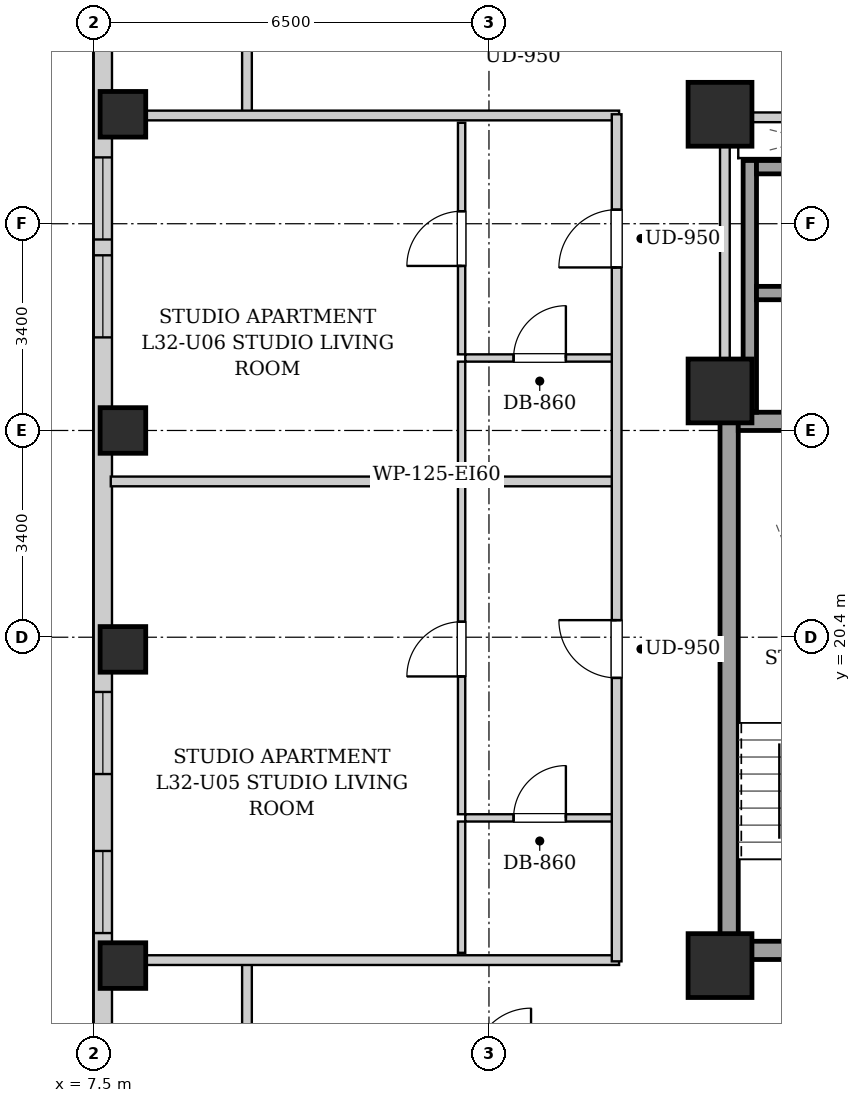
"""IFC4 building model, lengths in metres.
Left out: names, types, materials, properties, quantities, classifications, styles, units other than length and angle.
Written with IfcOpenShell. Run it as: python <this file> out.ifc"""

import sys

from ifc_helpers import new_model, si_unit, direction, frame, frame_2d, origin, origin_2d, place, context, subcontext, project, spatial, rectangle, extrude, element, fill, save


model = new_model("IFC4")
c1 = context("Model", 3, precision=1e-05, world=origin(), true_north=direction((0.0, 1.0)))
c2 = subcontext(c1, "Body", "Model", "MODEL_VIEW")
j1 = project(units=[si_unit("LENGTHUNIT", "METRE"), si_unit("PLANEANGLEUNIT", "RADIAN")], contexts=[c1])
p1 = place(None, origin())
s1 = spatial("IfcSite", under=j1, at=p1, CompositionType="ELEMENT")
p2 = place(p1, origin())
s2 = spatial("IfcBuilding", under=s1, at=p2, CompositionType="ELEMENT")
p3 = place(p2, frame((0.0, 0.0, 113.5)))
s3 = spatial("IfcBuildingStorey", under=s2, at=p3, CompositionType="ELEMENT", Elevation=113.5)
for number, where, z_axis, x_axis in (
    (1, (7.98, 15.0, 0.0), (0.0, 0.0, 1.0), (1.0, 0.0, 0.0)),
    (2, (7.98, 20.2, 0.0), (0.0, 0.0, 1.0), (1.0, 0.0, 0.0)),
    (3, (7.98, 23.8, 0.0), (0.0, 0.0, 1.0), (1.0, 0.0, 0.0)),
    (4, (7.98, 29.0, 0.0), (0.0, 0.0, 1.0), (1.0, 0.0, 0.0)),
):
    element("IfcColumn", number, at=place(p3, frame(where, z_axis=z_axis, x_axis=x_axis)), inside=s3, PredefinedType="COLUMN", context=c2, shape_type="SweptSolid", body=[
        extrude(rectangle(XDim=0.75, YDim=0.75, at=origin_2d()), origin(), (0.0, 0.0, 1.0), 3.2),
    ])
for number, where, z_axis, x_axis in (
    (5, (17.8, 15.0, 0.0), (0.0, 0.0, 1.0), (1.0, 0.0, 0.0)),
    (6, (17.8, 29.0, 0.0), (0.0, 0.0, 1.0), (1.0, 0.0, 0.0)),
    (7, (17.8, 24.45, 0.0), (0.0, 0.0, 1.0), (1.0, 0.0, 0.0)),
):
    element("IfcColumn", number, at=place(p3, frame(where, z_axis=z_axis, x_axis=x_axis)), inside=s3, PredefinedType="COLUMN", context=c2, shape_type="SweptSolid", body=[
        extrude(rectangle(XDim=1.05, YDim=1.05, at=origin_2d()), origin(), (0.0, 0.0, 1.0), 3.2),
    ])
p4 = place(p3, frame((7.65, 2.5, 0.0), z_axis=(0.0, 0.0, 1.0), x_axis=(0.0, 1.0, 0.0)))
e8 = element("IfcWall", 8, at=p4, inside=s3, PredefinedType="SOLIDWALL", context=c2, shape_type="SweptSolid", body=[
    extrude(rectangle(XDim=38.3, YDim=0.3, at=frame_2d((19.15, 0.0))), origin(), (0.0, 0.0, 1.0), 2.94),
])
p5 = place(p4, frame((3.38, 0.0, 0.55)))
e9 = element("IfcOpeningElement", 9, at=p5, cuts=e8, PredefinedType="OPENING", context=c2, shape_type="SweptSolid", body=[
    extrude(rectangle(XDim=1.35, YDim=1.2, at=frame_2d((0.675, 0.6))), frame((0.0, 0.16, 0.0), z_axis=(0.0, -1.0, 0.0), x_axis=(1.0, 0.0, 0.0)), (0.0, 0.0, 1.0), 0.32),
])
p6 = place(p4, frame((1.135, 0.0, 0.55)))
e10 = element("IfcOpeningElement", 10, at=p6, cuts=e8, PredefinedType="OPENING", context=c2, shape_type="SweptSolid", body=[
    extrude(rectangle(XDim=1.35, YDim=1.2, at=frame_2d((0.675, 0.6))), frame((0.0, 0.16, 0.0), z_axis=(0.0, -1.0, 0.0), x_axis=(1.0, 0.0, 0.0)), (0.0, 0.0, 1.0), 0.32),
])
p7 = place(p4, frame((33.946, 0.0, 0.55)))
e11 = element("IfcOpeningElement", 11, at=p7, cuts=e8, PredefinedType="OPENING", context=c2, shape_type="SweptSolid", body=[
    extrude(rectangle(XDim=1.35, YDim=1.2, at=frame_2d((0.675, 0.6))), frame((0.0, 0.16, 0.0), z_axis=(0.0, -1.0, 0.0), x_axis=(1.0, 0.0, 0.0)), (0.0, 0.0, 1.0), 0.32),
])
p8 = place(p4, frame((32.035, 0.0, 0.55)))
e12 = element("IfcOpeningElement", 12, at=p8, cuts=e8, PredefinedType="OPENING", context=c2, shape_type="SweptSolid", body=[
    extrude(rectangle(XDim=1.35, YDim=1.2, at=frame_2d((0.675, 0.6))), frame((0.0, 0.16, 0.0), z_axis=(0.0, -1.0, 0.0), x_axis=(1.0, 0.0, 0.0)), (0.0, 0.0, 1.0), 0.32),
])
p9 = place(p4, frame((15.65, 0.0, 0.55)))
e13 = element("IfcOpeningElement", 13, at=p9, cuts=e8, PredefinedType="OPENING", context=c2, shape_type="SweptSolid", body=[
    extrude(rectangle(XDim=1.35, YDim=1.2, at=frame_2d((0.675, 0.6))), frame((0.0, 0.16, 0.0), z_axis=(0.0, -1.0, 0.0), x_axis=(1.0, 0.0, 0.0)), (0.0, 0.0, 1.0), 0.32),
])
p10 = place(p4, frame((13.035, 0.0, 0.55)))
e14 = element("IfcOpeningElement", 14, at=p10, cuts=e8, PredefinedType="OPENING", context=c2, shape_type="SweptSolid", body=[
    extrude(rectangle(XDim=1.35, YDim=1.2, at=frame_2d((0.675, 0.6))), frame((0.0, 0.16, 0.0), z_axis=(0.0, -1.0, 0.0), x_axis=(1.0, 0.0, 0.0)), (0.0, 0.0, 1.0), 0.32),
])
p11 = place(p4, frame((22.831, 0.0, 0.55)))
e15 = element("IfcOpeningElement", 15, at=p11, cuts=e8, PredefinedType="OPENING", context=c2, shape_type="SweptSolid", body=[
    extrude(rectangle(XDim=1.35, YDim=1.2, at=frame_2d((0.675, 0.6))), frame((0.0, 0.16, 0.0), z_axis=(0.0, -1.0, 0.0), x_axis=(1.0, 0.0, 0.0)), (0.0, 0.0, 1.0), 0.32),
])
p12 = place(p4, frame((24.441, 0.0, 0.55)))
e16 = element("IfcOpeningElement", 16, at=p12, cuts=e8, PredefinedType="OPENING", context=c2, shape_type="SweptSolid", body=[
    extrude(rectangle(XDim=1.35, YDim=1.2, at=frame_2d((0.675, 0.6))), frame((0.0, 0.16, 0.0), z_axis=(0.0, -1.0, 0.0), x_axis=(1.0, 0.0, 0.0)), (0.0, 0.0, 1.0), 0.32),
])
p13 = place(p3, frame((17.95, 15.1, 0.0), z_axis=(0.0, 0.0, 1.0), x_axis=(0.0, 1.0, 0.0)))
e17 = element("IfcWall", 17, at=p13, inside=s3, PredefinedType="SHEAR", context=c2, shape_type="SweptSolid", body=[
    extrude(rectangle(XDim=9.0, YDim=0.3, at=frame_2d((4.5, 0.0))), origin(), (0.0, 0.0, 1.0), 2.94),
])
p14 = place(p3, frame((18.1, 23.95, 0.0), z_axis=(0.0, 0.0, 1.0), x_axis=(1.0, 0.0, 0.0)))
e18 = element("IfcWall", 18, at=p14, inside=s3, PredefinedType="SHEAR", context=c2, shape_type="SweptSolid", body=[
    extrude(rectangle(XDim=2.85, YDim=0.3, at=frame_2d((1.425, 0.0))), origin(), (0.0, 0.0, 1.0), 2.94),
])
p15 = place(p3, frame((18.1, 15.25, 0.0), z_axis=(0.0, 0.0, 1.0), x_axis=(1.0, 0.0, 0.0)))
e19 = element("IfcWall", 19, at=p15, inside=s3, PredefinedType="SHEAR", context=c2, shape_type="SweptSolid", body=[
    extrude(rectangle(XDim=2.85, YDim=0.3, at=frame_2d((1.425, 0.0))), origin(), (0.0, 0.0, 1.0), 2.94),
])
p16 = place(p15, frame((0.86, 0.0, 0.0)))
e20 = element("IfcOpeningElement", 20, at=p16, cuts=e19, PredefinedType="OPENING", context=c2, shape_type="SweptSolid", body=[
    extrude(rectangle(XDim=1.1, YDim=2.05, at=frame_2d((0.55, 1.025))), frame((0.0, 0.16, 0.0), z_axis=(0.0, -1.0, 0.0), x_axis=(1.0, 0.0, 0.0)), (0.0, 0.0, 1.0), 0.32),
])
p17 = place(p3, frame((18.29, 24.1, 0.0), z_axis=(0.0, 0.0, 1.0), x_axis=(0.0, 1.0, 0.0)))
e21 = element("IfcWall", 21, at=p17, inside=s3, PredefinedType="SHEAR", context=c2, shape_type="SweptSolid", body=[
    extrude(rectangle(XDim=4.14, YDim=0.22, at=frame_2d((2.07, 0.0))), origin(), (0.0, 0.0, 1.0), 2.94),
])
for number, where, z_axis, x_axis in (
    (22, (18.4, 26.06, 0.0), (0.0, 0.0, 1.0), (1.0, 0.0, 0.0)),
    (23, (18.4, 28.13, 0.0), (0.0, 0.0, 1.0), (1.0, 0.0, 0.0)),
):
    element("IfcWall", number, at=place(p3, frame(where, z_axis=z_axis, x_axis=x_axis)), inside=s3, PredefinedType="SHEAR", context=c2, shape_type="SweptSolid", body=[
        extrude(rectangle(XDim=1.9, YDim=0.22, at=frame_2d((0.95, 0.0))), origin(), (0.0, 0.0, 1.0), 2.94),
    ])
p18 = place(p3, frame((17.88, 24.12, 0.0), z_axis=(0.0, 0.0, 1.0), x_axis=(0.0, 1.0, 0.0)))
e24 = element("IfcWall", 24, at=p18, inside=s3, PredefinedType="PARTITIONING", context=c2, shape_type="SweptSolid", body=[
    extrude(rectangle(XDim=4.76, YDim=0.16, at=frame_2d((2.38, 0.0))), origin(), (0.0, 0.0, 1.0), 2.94),
])
p19 = place(p3, frame((17.96, 28.95, 0.0), z_axis=(0.0, 0.0, 1.0), x_axis=(1.0, 0.0, 0.0)))
e25 = element("IfcWall", 25, at=p19, inside=s3, PredefinedType="PARTITIONING", context=c2, shape_type="SweptSolid", body=[
    extrude(rectangle(XDim=4.29, YDim=0.16, at=frame_2d((2.145, 0.0))), origin(), (0.0, 0.0, 1.0), 2.313),
])
p20 = place(p19, frame((1.645, 0.0, 0.0)))
e26 = element("IfcOpeningElement", 26, at=p20, cuts=e25, PredefinedType="OPENING", context=c2, shape_type="SweptSolid", body=[
    extrude(rectangle(XDim=0.86, YDim=2.05, at=frame_2d((0.43, 1.025))), frame((0.0, 0.09, 0.0), z_axis=(0.0, -1.0, 0.0), x_axis=(1.0, 0.0, 0.0)), (0.0, 0.0, 1.0), 0.18),
])
for number, where, z_axis, x_axis in (
    (27, (10.02, 13.35, 0.0), (0.0, 0.0, 1.0), (0.0, 1.0, 0.0)),
    (28, (10.02, 28.98, 0.0), (0.0, 0.0, 1.0), (0.0, 1.0, 0.0)),
):
    element("IfcWall", number, at=place(p3, frame(where, z_axis=z_axis, x_axis=x_axis)), inside=s3, PredefinedType="PARTITIONING", context=c2, shape_type="SweptSolid", body=[
        extrude(rectangle(XDim=1.74, YDim=0.16, at=frame_2d((0.87, 0.0))), origin(), (0.0, 0.0, 1.0), 2.94),
    ])
for number, where, z_axis, x_axis in (
    (29, (7.78, 15.09, 0.0), (0.0, 0.0, 1.0), (1.0, 0.0, 0.0)),
    (30, (7.78, 28.98, 0.0), (0.0, 0.0, 1.0), (1.0, 0.0, 0.0)),
):
    element("IfcWall", number, at=place(p3, frame(where, z_axis=z_axis, x_axis=x_axis)), inside=s3, PredefinedType="PARTITIONING", context=c2, shape_type="SweptSolid", body=[
        extrude(rectangle(XDim=8.36, YDim=0.16, at=frame_2d((4.18, 0.0))), origin(), (0.0, 0.0, 1.0), 2.313),
    ])
p21 = place(p3, frame((7.78, 22.962, 0.0), z_axis=(0.0, 0.0, 1.0), x_axis=(1.0, 0.0, 0.0)))
e31 = element("IfcWall", 31, at=p21, inside=s3, PredefinedType="PARTITIONING", context=c2, shape_type="SweptSolid", body=[
    extrude(rectangle(XDim=8.28, YDim=0.16, at=frame_2d((4.14, 0.0))), origin(), (0.0, 0.0, 1.0), 2.94),
])
p22 = place(p3, frame((13.61, 17.429, 0.0), z_axis=(0.0, 0.0, 1.0), x_axis=(1.0, 0.0, 0.0)))
e32 = element("IfcWall", 32, at=p22, inside=s3, PredefinedType="PARTITIONING", context=c2, shape_type="SweptSolid", body=[
    extrude(rectangle(XDim=2.45, YDim=0.12, at=frame_2d((1.225, 0.0))), origin(), (0.0, 0.0, 1.0), 2.94),
])
p23 = place(p22, frame((0.795, 0.0, 0.0)))
e33 = element("IfcOpeningElement", 33, at=p23, cuts=e32, PredefinedType="OPENING", context=c2, shape_type="SweptSolid", body=[
    extrude(rectangle(XDim=0.86, YDim=2.05, at=frame_2d((0.43, 1.025))), frame((0.0, 0.07, 0.0), z_axis=(0.0, -1.0, 0.0), x_axis=(1.0, 0.0, 0.0)), (0.0, 0.0, 1.0), 0.14),
])
p24 = place(p3, frame((13.55, 15.21, 0.0), z_axis=(0.0, 0.0, 1.0), x_axis=(0.0, 1.0, 0.0)))
e34 = element("IfcWall", 34, at=p24, inside=s3, PredefinedType="PARTITIONING", context=c2, shape_type="SweptSolid", body=[
    extrude(rectangle(XDim=2.159, YDim=0.12, at=frame_2d((1.08, 0.0))), origin(), (0.0, 0.0, 1.0), 2.94),
])
p25 = place(p3, frame((13.55, 17.489, 0.0), z_axis=(0.0, 0.0, 1.0), x_axis=(0.0, 1.0, 0.0)))
e35 = element("IfcWall", 35, at=p25, inside=s3, PredefinedType="PARTITIONING", context=c2, shape_type="SweptSolid", body=[
    extrude(rectangle(XDim=5.433, YDim=0.12, at=frame_2d((2.717, 0.0))), origin(), (0.0, 0.0, 1.0), 2.94),
])
p26 = place(p25, frame((2.266, 0.0, 0.0)))
e36 = element("IfcOpeningElement", 36, at=p26, cuts=e35, PredefinedType="OPENING", context=c2, shape_type="SweptSolid", body=[
    extrude(rectangle(XDim=0.9, YDim=2.05, at=frame_2d((0.45, 1.025))), frame((0.0, 0.07, 0.0), z_axis=(0.0, -1.0, 0.0), x_axis=(1.0, 0.0, 0.0)), (0.0, 0.0, 1.0), 0.14),
])
p27 = place(p3, frame((13.61, 24.992, 0.0), z_axis=(0.0, 0.0, 1.0), x_axis=(1.0, 0.0, 0.0)))
e37 = element("IfcWall", 37, at=p27, inside=s3, PredefinedType="PARTITIONING", context=c2, shape_type="SweptSolid", body=[
    extrude(rectangle(XDim=2.45, YDim=0.12, at=frame_2d((1.225, 0.0))), origin(), (0.0, 0.0, 1.0), 2.94),
])
p28 = place(p27, frame((0.795, 0.0, 0.0)))
e38 = element("IfcOpeningElement", 38, at=p28, cuts=e37, PredefinedType="OPENING", context=c2, shape_type="SweptSolid", body=[
    extrude(rectangle(XDim=0.86, YDim=2.05, at=frame_2d((0.43, 1.025))), frame((0.0, 0.07, 0.0), z_axis=(0.0, -1.0, 0.0), x_axis=(1.0, 0.0, 0.0)), (0.0, 0.0, 1.0), 0.14),
])
p29 = place(p3, frame((13.55, 23.082, 0.0), z_axis=(0.0, 0.0, 1.0), x_axis=(0.0, 1.0, 0.0)))
e39 = element("IfcWall", 39, at=p29, inside=s3, PredefinedType="PARTITIONING", context=c2, shape_type="SweptSolid", body=[
    extrude(rectangle(XDim=1.85, YDim=0.12, at=frame_2d((0.925, 0.0))), origin(), (0.0, 0.0, 1.0), 2.94),
])
p30 = place(p3, frame((13.55, 25.052, 0.0), z_axis=(0.0, 0.0, 1.0), x_axis=(0.0, 1.0, 0.0)))
e40 = element("IfcWall", 40, at=p30, inside=s3, PredefinedType="PARTITIONING", context=c2, shape_type="SweptSolid", body=[
    extrude(rectangle(XDim=3.808, YDim=0.12, at=frame_2d((1.904, 0.0))), origin(), (0.0, 0.0, 1.0), 2.94),
])
p31 = place(p30, frame((1.454, 0.0, 0.0)))
e41 = element("IfcOpeningElement", 41, at=p31, cuts=e40, PredefinedType="OPENING", context=c2, shape_type="SweptSolid", body=[
    extrude(rectangle(XDim=0.9, YDim=2.05, at=frame_2d((0.45, 1.025))), frame((0.0, 0.07, 0.0), z_axis=(0.0, -1.0, 0.0), x_axis=(1.0, 0.0, 0.0)), (0.0, 0.0, 1.0), 0.14),
])
p32 = place(p3, frame((16.1, 15.07, 0.0), z_axis=(0.0, 0.0, 1.0), x_axis=(0.0, 1.0, 0.0)))
e42 = element("IfcWall", 42, at=p32, inside=s3, PredefinedType="PARTITIONING", context=c2, shape_type="SweptSolid", body=[
    extrude(rectangle(XDim=13.93, YDim=0.16, at=frame_2d((6.965, 0.0))), origin(), (0.0, 0.0, 1.0), 2.94),
])
p33 = place(p32, frame((4.661, 0.0, 0.0)))
e43 = element("IfcOpeningElement", 43, at=p33, cuts=e42, PredefinedType="OPENING", context=c2, shape_type="SweptSolid", body=[
    extrude(rectangle(XDim=0.95, YDim=2.1, at=frame_2d((0.475, 1.05))), frame((0.0, 0.09, 0.0), z_axis=(0.0, -1.0, 0.0), x_axis=(1.0, 0.0, 0.0)), (0.0, 0.0, 1.0), 0.18),
])
p34 = place(p32, frame((11.411, 0.0, 0.0)))
e44 = element("IfcOpeningElement", 44, at=p34, cuts=e42, PredefinedType="OPENING", context=c2, shape_type="SweptSolid", body=[
    extrude(rectangle(XDim=0.95, YDim=2.1, at=frame_2d((0.475, 1.05))), frame((0.0, 0.09, 0.0), z_axis=(0.0, -1.0, 0.0), x_axis=(1.0, 0.0, 0.0)), (0.0, 0.0, 1.0), 0.18),
])
p35 = place(p23, origin())
e45 = element("IfcDoor", 45, at=p35, inside=s3, OperationType="SINGLE_SWING_RIGHT", PredefinedType="DOOR", context=c2, shape_type="SweptSolid", body=[
    extrude(rectangle(XDim=0.86, YDim=2.05, at=frame_2d((0.43, 1.025))), frame((0.0, 0.025, 0.0), z_axis=(0.0, -1.0, 0.0), x_axis=(1.0, 0.0, 0.0)), (0.0, 0.0, 1.0), 0.05),
])
fill(e33, e45)
p36 = place(p26, origin())
e46 = element("IfcDoor", 46, at=p36, inside=s3, OperationType="SINGLE_SWING_LEFT", PredefinedType="DOOR", context=c2, shape_type="SweptSolid", body=[
    extrude(rectangle(XDim=0.9, YDim=2.05, at=frame_2d((0.45, 1.025))), frame((0.0, 0.025, 0.0), z_axis=(0.0, -1.0, 0.0), x_axis=(1.0, 0.0, 0.0)), (0.0, 0.0, 1.0), 0.05),
])
fill(e36, e46)
p37 = place(p28, origin())
e47 = element("IfcDoor", 47, at=p37, inside=s3, OperationType="SINGLE_SWING_RIGHT", PredefinedType="DOOR", context=c2, shape_type="SweptSolid", body=[
    extrude(rectangle(XDim=0.86, YDim=2.05, at=frame_2d((0.43, 1.025))), frame((0.0, 0.025, 0.0), z_axis=(0.0, -1.0, 0.0), x_axis=(1.0, 0.0, 0.0)), (0.0, 0.0, 1.0), 0.05),
])
fill(e38, e47)
p38 = place(p31, origin())
e48 = element("IfcDoor", 48, at=p38, inside=s3, OperationType="SINGLE_SWING_LEFT", PredefinedType="DOOR", context=c2, shape_type="SweptSolid", body=[
    extrude(rectangle(XDim=0.9, YDim=2.05, at=frame_2d((0.45, 1.025))), frame((0.0, 0.025, 0.0), z_axis=(0.0, -1.0, 0.0), x_axis=(1.0, 0.0, 0.0)), (0.0, 0.0, 1.0), 0.05),
])
fill(e41, e48)
p39 = place(p33, origin())
e49 = element("IfcDoor", 49, at=p39, inside=s3, OperationType="SINGLE_SWING_RIGHT", PredefinedType="DOOR", context=c2, shape_type="SweptSolid", body=[
    extrude(rectangle(XDim=0.95, YDim=2.1, at=frame_2d((0.475, 1.05))), frame((0.0, 0.025, 0.0), z_axis=(0.0, -1.0, 0.0), x_axis=(1.0, 0.0, 0.0)), (0.0, 0.0, 1.0), 0.05),
])
fill(e43, e49)
p40 = place(p34, origin())
e50 = element("IfcDoor", 50, at=p40, inside=s3, OperationType="SINGLE_SWING_LEFT", PredefinedType="DOOR", context=c2, shape_type="SweptSolid", body=[
    extrude(rectangle(XDim=0.95, YDim=2.1, at=frame_2d((0.475, 1.05))), frame((0.0, 0.025, 0.0), z_axis=(0.0, -1.0, 0.0), x_axis=(1.0, 0.0, 0.0)), (0.0, 0.0, 1.0), 0.05),
])
fill(e44, e50)
p41 = place(p9, origin())
e51 = element("IfcWindow", 51, at=p41, inside=s3, PartitioningType="SINGLE_PANEL", PredefinedType="WINDOW", context=c2, shape_type="SweptSolid", body=[
    extrude(rectangle(XDim=1.35, YDim=1.2, at=frame_2d((0.675, 0.6))), frame((0.0, 0.03, 0.0), z_axis=(0.0, -1.0, 0.0), x_axis=(1.0, 0.0, 0.0)), (0.0, 0.0, 1.0), 0.06),
])
fill(e13, e51)
p42 = place(p10, origin())
e52 = element("IfcWindow", 52, at=p42, inside=s3, PartitioningType="SINGLE_PANEL", PredefinedType="WINDOW", context=c2, shape_type="SweptSolid", body=[
    extrude(rectangle(XDim=1.35, YDim=1.2, at=frame_2d((0.675, 0.6))), frame((0.0, 0.03, 0.0), z_axis=(0.0, -1.0, 0.0), x_axis=(1.0, 0.0, 0.0)), (0.0, 0.0, 1.0), 0.06),
])
fill(e14, e52)
p43 = place(p11, origin())
e53 = element("IfcWindow", 53, at=p43, inside=s3, PartitioningType="SINGLE_PANEL", PredefinedType="WINDOW", context=c2, shape_type="SweptSolid", body=[
    extrude(rectangle(XDim=1.35, YDim=1.2, at=frame_2d((0.675, 0.6))), frame((0.0, 0.03, 0.0), z_axis=(0.0, -1.0, 0.0), x_axis=(1.0, 0.0, 0.0)), (0.0, 0.0, 1.0), 0.06),
])
fill(e15, e53)
p44 = place(p12, origin())
e54 = element("IfcWindow", 54, at=p44, inside=s3, PartitioningType="SINGLE_PANEL", PredefinedType="WINDOW", context=c2, shape_type="SweptSolid", body=[
    extrude(rectangle(XDim=1.35, YDim=1.2, at=frame_2d((0.675, 0.6))), frame((0.0, 0.03, 0.0), z_axis=(0.0, -1.0, 0.0), x_axis=(1.0, 0.0, 0.0)), (0.0, 0.0, 1.0), 0.06),
])
fill(e16, e54)
save(model, sys.argv[1])
